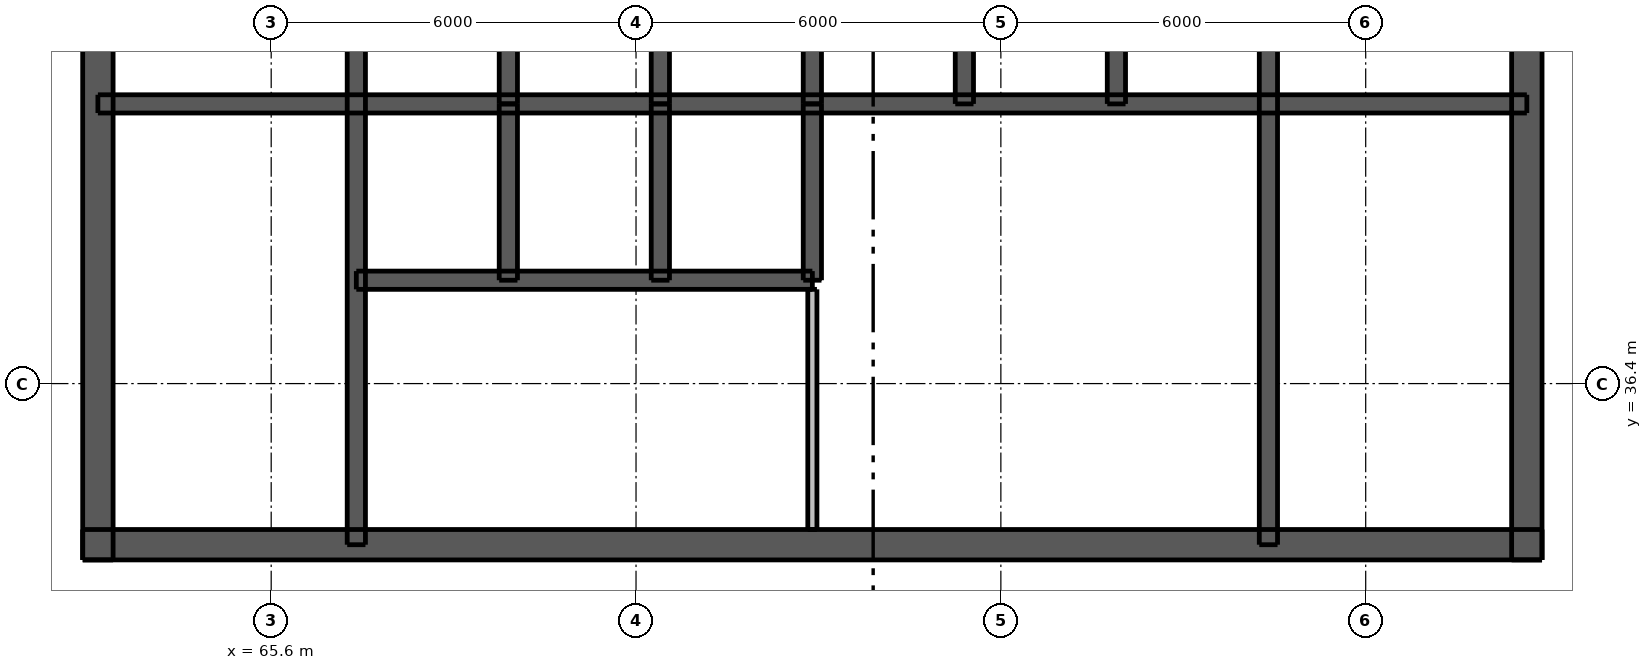
"""IFC4 building model, lengths in metres.
Left out: names, types, materials, properties, quantities, classifications, styles, units other than length and angle.
Written with IfcOpenShell. Run it as: python <this file> out.ifc"""

import sys

from ifc_helpers import new_model, si_unit, direction, frame, frame_2d, origin, place, context, subcontext, project, spatial, rectangle, extrude, element, fill, save


model = new_model("IFC4")
c1 = context("Model", 3, precision=1e-05, world=origin(), true_north=direction((0.0, 1.0)))
c2 = subcontext(c1, "Body", "Model", "MODEL_VIEW")
j1 = project(units=[si_unit("LENGTHUNIT", "METRE"), si_unit("PLANEANGLEUNIT", "RADIAN")], contexts=[c1])
p1 = place(None, origin())
s1 = spatial("IfcSite", under=j1, at=p1, CompositionType="ELEMENT")
p2 = place(p1, origin())
s2 = spatial("IfcBuilding", under=s1, at=p2, CompositionType="ELEMENT")
p3 = place(p2, frame((0.0, 0.0, 271.9)))
s3 = spatial("IfcBuildingStorey", under=s2, at=p3, CompositionType="ELEMENT", Elevation=271.9)
p4 = place(p3, frame((62.5, 33.75, 0.0), z_axis=(0.0, 0.0, 1.0), x_axis=(1.0, 0.0, 0.0)))
e1 = element("IfcWall", 1, at=p4, inside=s3, PredefinedType="SHEAR", context=c2, shape_type="SweptSolid", body=[
    extrude(rectangle(XDim=24.0, YDim=0.5, at=frame_2d((12.0, 0.0))), origin(), (0.0, 0.0, 1.0), 3.05),
])
p5 = place(p4, frame((1.875, 0.0, 0.0)))
e2 = element("IfcOpeningElement", 2, at=p5, cuts=e1, PredefinedType="OPENING", context=c2, shape_type="SweptSolid", body=[
    extrude(rectangle(XDim=1.1, YDim=2.1, at=frame_2d((0.55, 1.05))), frame((0.0, 0.26, 0.0), z_axis=(0.0, -1.0, 0.0), x_axis=(1.0, 0.0, 0.0)), (0.0, 0.0, 1.0), 0.52),
])
p6 = place(p4, frame((21.025, 0.0, 0.0)))
e3 = element("IfcOpeningElement", 3, at=p6, cuts=e1, PredefinedType="OPENING", context=c2, shape_type="SweptSolid", body=[
    extrude(rectangle(XDim=1.1, YDim=2.1, at=frame_2d((0.55, 1.05))), frame((0.0, 0.26, 0.0), z_axis=(0.0, -1.0, 0.0), x_axis=(1.0, 0.0, 0.0)), (0.0, 0.0, 1.0), 0.52),
])
p7 = place(p4, frame((8.0, 0.0, 0.0)))
e4 = element("IfcOpeningElement", 4, at=p7, cuts=e1, PredefinedType="OPENING", context=c2, shape_type="SweptSolid", body=[
    extrude(rectangle(XDim=1.1, YDim=2.1, at=frame_2d((0.55, 1.05))), frame((0.0, 0.26, 0.0), z_axis=(0.0, -1.0, 0.0), x_axis=(1.0, 0.0, 0.0)), (0.0, 0.0, 1.0), 0.52),
])
p8 = place(p4, frame((15.3, 0.0, 0.0)))
e5 = element("IfcOpeningElement", 5, at=p8, cuts=e1, PredefinedType="OPENING", context=c2, shape_type="SweptSolid", body=[
    extrude(rectangle(XDim=0.9, YDim=2.1, at=frame_2d((0.45, 1.05))), frame((0.0, 0.26, 0.0), z_axis=(0.0, -1.0, 0.0), x_axis=(1.0, 0.0, 0.0)), (0.0, 0.0, 1.0), 0.52),
])
p9 = place(p3, frame((62.75, 33.5, 0.0), z_axis=(0.0, 0.0, 1.0), x_axis=(0.0, 1.0, 0.0)))
e6 = element("IfcWall", 6, at=p9, inside=s3, PredefinedType="SHEAR", context=c2, shape_type="SweptSolid", body=[
    extrude(rectangle(XDim=24.0, YDim=0.5, at=frame_2d((12.0, 0.0))), origin(), (0.0, 0.0, 1.0), 3.05),
])
p10 = place(p9, frame((11.2, 0.0, 0.0)))
e7 = element("IfcOpeningElement", 7, at=p10, cuts=e6, PredefinedType="OPENING", context=c2, shape_type="SweptSolid", body=[
    extrude(rectangle(XDim=1.6, YDim=2.1, at=frame_2d((0.8, 1.05))), frame((0.0, 0.26, 0.0), z_axis=(0.0, -1.0, 0.0), x_axis=(1.0, 0.0, 0.0)), (0.0, 0.0, 1.0), 0.52),
])
p11 = place(p3, frame((86.25, 33.5, 0.0), z_axis=(0.0, 0.0, 1.0), x_axis=(0.0, 1.0, 0.0)))
e8 = element("IfcWall", 8, at=p11, inside=s3, PredefinedType="SHEAR", context=c2, shape_type="SweptSolid", body=[
    extrude(rectangle(XDim=24.0, YDim=0.5, at=frame_2d((12.0, 0.0))), origin(), (0.0, 0.0, 1.0), 3.05),
])
p12 = place(p11, frame((11.2, 0.0, 0.0)))
e9 = element("IfcOpeningElement", 9, at=p12, cuts=e8, PredefinedType="OPENING", context=c2, shape_type="SweptSolid", body=[
    extrude(rectangle(XDim=1.6, YDim=2.1, at=frame_2d((0.8, 1.05))), frame((0.0, 0.26, 0.0), z_axis=(0.0, -1.0, 0.0), x_axis=(1.0, 0.0, 0.0)), (0.0, 0.0, 1.0), 0.52),
])
p13 = place(p3, frame((62.75, 41.0, 0.0), z_axis=(0.0, 0.0, 1.0), x_axis=(1.0, 0.0, 0.0)))
e10 = element("IfcWall", 10, at=p13, inside=s3, PredefinedType="SHEAR", context=c2, shape_type="SweptSolid", body=[
    extrude(rectangle(XDim=23.5, YDim=0.3, at=frame_2d((11.75, 0.0))), origin(), (0.0, 0.0, 1.0), 3.05),
])
p14 = place(p3, frame((67.0, 33.75, 0.0), z_axis=(0.0, 0.0, 1.0), x_axis=(0.0, 1.0, 0.0)))
e11 = element("IfcWall", 11, at=p14, inside=s3, PredefinedType="SHEAR", context=c2, shape_type="SweptSolid", body=[
    extrude(rectangle(XDim=10.15, YDim=0.3, at=frame_2d((5.075, 0.0))), origin(), (0.0, 0.0, 1.0), 3.05),
])
p15 = place(p14, frame((0.45, 0.0, 0.0)))
e12 = element("IfcOpeningElement", 12, at=p15, cuts=e11, PredefinedType="OPENING", context=c2, shape_type="SweptSolid", body=[
    extrude(rectangle(XDim=1.1, YDim=2.1, at=frame_2d((0.55, 1.05))), frame((0.0, 0.16, 0.0), z_axis=(0.0, -1.0, 0.0), x_axis=(1.0, 0.0, 0.0)), (0.0, 0.0, 1.0), 0.32),
])
p16 = place(p3, frame((82.0, 33.75, 0.0), z_axis=(0.0, 0.0, 1.0), x_axis=(0.0, 1.0, 0.0)))
e13 = element("IfcWall", 13, at=p16, inside=s3, PredefinedType="SHEAR", context=c2, shape_type="SweptSolid", body=[
    extrude(rectangle(XDim=10.15, YDim=0.3, at=frame_2d((5.075, 0.0))), origin(), (0.0, 0.0, 1.0), 3.05),
])
for number, where, z_axis, x_axis in (
    (14, (69.5, 41.0, 0.0), (0.0, 0.0, 1.0), (0.0, 1.0, 0.0)),
    (15, (72.0, 41.0, 0.0), (0.0, 0.0, 1.0), (0.0, 1.0, 0.0)),
    (16, (74.5, 41.0, 0.0), (0.0, 0.0, 1.0), (0.0, 1.0, 0.0)),
    (17, (77.0, 41.0, 0.0), (0.0, 0.0, 1.0), (0.0, 1.0, 0.0)),
    (18, (79.5, 41.0, 0.0), (0.0, 0.0, 1.0), (0.0, 1.0, 0.0)),
):
    element("IfcWall", number, at=place(p3, frame(where, z_axis=z_axis, x_axis=x_axis)), inside=s3, PredefinedType="SHEAR", context=c2, shape_type="SweptSolid", body=[
        extrude(rectangle(XDim=2.9, YDim=0.3, at=frame_2d((1.45, 0.0))), origin(), (0.0, 0.0, 1.0), 3.05),
    ])
p17 = place(p3, frame((67.0, 38.1, 0.0), z_axis=(0.0, 0.0, 1.0), x_axis=(1.0, 0.0, 0.0)))
e19 = element("IfcWall", 19, at=p17, inside=s3, PredefinedType="SHEAR", context=c2, shape_type="SweptSolid", body=[
    extrude(rectangle(XDim=7.5, YDim=0.3, at=frame_2d((3.75, 0.0))), origin(), (0.0, 0.0, 1.0), 3.05),
])
p18 = place(p17, frame((0.7, 0.0, 0.0)))
e20 = element("IfcOpeningElement", 20, at=p18, cuts=e19, PredefinedType="OPENING", context=c2, shape_type="SweptSolid", body=[
    extrude(rectangle(XDim=1.1, YDim=2.1, at=frame_2d((0.55, 1.05))), frame((0.0, 0.16, 0.0), z_axis=(0.0, -1.0, 0.0), x_axis=(1.0, 0.0, 0.0)), (0.0, 0.0, 1.0), 0.32),
])
p19 = place(p17, frame((3.2, 0.0, 0.0)))
e21 = element("IfcOpeningElement", 21, at=p19, cuts=e19, PredefinedType="OPENING", context=c2, shape_type="SweptSolid", body=[
    extrude(rectangle(XDim=1.1, YDim=2.1, at=frame_2d((0.55, 1.05))), frame((0.0, 0.16, 0.0), z_axis=(0.0, -1.0, 0.0), x_axis=(1.0, 0.0, 0.0)), (0.0, 0.0, 1.0), 0.32),
])
p20 = place(p17, frame((5.65, 0.0, 0.0)))
e22 = element("IfcOpeningElement", 22, at=p20, cuts=e19, PredefinedType="OPENING", context=c2, shape_type="SweptSolid", body=[
    extrude(rectangle(XDim=1.2, YDim=2.1, at=frame_2d((0.6, 1.05))), frame((0.0, 0.16, 0.0), z_axis=(0.0, -1.0, 0.0), x_axis=(1.0, 0.0, 0.0)), (0.0, 0.0, 1.0), 0.32),
])
for number, where, z_axis, x_axis in (
    (23, (69.5, 38.1, 0.0), (0.0, 0.0, 1.0), (0.0, 1.0, 0.0)),
    (24, (72.0, 38.1, 0.0), (0.0, 0.0, 1.0), (0.0, 1.0, 0.0)),
    (25, (74.5, 38.1, 0.0), (0.0, 0.0, 1.0), (0.0, 1.0, 0.0)),
):
    element("IfcWall", number, at=place(p3, frame(where, z_axis=z_axis, x_axis=x_axis)), inside=s3, PredefinedType="SHEAR", context=c2, shape_type="SweptSolid", body=[
        extrude(rectangle(XDim=2.9, YDim=0.3, at=frame_2d((1.45, 0.0))), origin(), (0.0, 0.0, 1.0), 3.05),
    ])
p21 = place(p3, frame((74.5, 34.0, 0.0), z_axis=(0.0, 0.0, 1.0), x_axis=(0.0, 1.0, 0.0)))
e26 = element("IfcWall", 26, at=p21, inside=s3, PredefinedType="PLUMBINGWALL", context=c2, shape_type="SweptSolid", body=[
    extrude(rectangle(XDim=3.95, YDim=0.15, at=frame_2d((1.975, 0.0))), origin(), (0.0, 0.0, 1.0), 3.05),
])
p22 = place(p5, origin())
e27 = element("IfcDoor", 27, at=p22, inside=s3, OperationType="SINGLE_SWING_LEFT", PredefinedType="DOOR", context=c2, shape_type="SweptSolid", body=[
    extrude(rectangle(XDim=1.1, YDim=2.1, at=frame_2d((0.55, 1.05))), frame((0.0, 0.237, 0.0), z_axis=(0.0, -1.0, 0.0), x_axis=(1.0, 0.0, 0.0)), (0.0, 0.0, 1.0), 0.05),
])
fill(e2, e27)
p23 = place(p6, origin())
e28 = element("IfcDoor", 28, at=p23, inside=s3, OperationType="SINGLE_SWING_RIGHT", PredefinedType="DOOR", context=c2, shape_type="SweptSolid", body=[
    extrude(rectangle(XDim=1.1, YDim=2.1, at=frame_2d((0.55, 1.05))), frame((0.0, 0.237, 0.0), z_axis=(0.0, -1.0, 0.0), x_axis=(1.0, 0.0, 0.0)), (0.0, 0.0, 1.0), 0.05),
])
fill(e3, e28)
p24 = place(p7, origin())
e29 = element("IfcDoor", 29, at=p24, inside=s3, OperationType="SINGLE_SWING_LEFT", PredefinedType="DOOR", context=c2, shape_type="SweptSolid", body=[
    extrude(rectangle(XDim=1.1, YDim=2.1, at=frame_2d((0.55, 1.05))), frame((0.0, 0.237, 0.0), z_axis=(0.0, -1.0, 0.0), x_axis=(1.0, 0.0, 0.0)), (0.0, 0.0, 1.0), 0.05),
])
fill(e4, e29)
p25 = place(p15, origin())
e30 = element("IfcDoor", 30, at=p25, inside=s3, OperationType="SINGLE_SWING_RIGHT", PredefinedType="DOOR", context=c2, shape_type="SweptSolid", body=[
    extrude(rectangle(XDim=1.1, YDim=2.1, at=frame_2d((0.55, 1.05))), frame((0.0, -0.087, 0.0), z_axis=(0.0, -1.0, 0.0), x_axis=(1.0, 0.0, 0.0)), (0.0, 0.0, 1.0), 0.05),
])
fill(e12, e30)
p26 = place(p8, origin())
e31 = element("IfcDoor", 31, at=p26, inside=s3, OperationType="SINGLE_SWING_LEFT", PredefinedType="DOOR", context=c2, shape_type="SweptSolid", body=[
    extrude(rectangle(XDim=0.9, YDim=2.1, at=frame_2d((0.45, 1.05))), frame((0.0, 0.237, 0.0), z_axis=(0.0, -1.0, 0.0), x_axis=(1.0, 0.0, 0.0)), (0.0, 0.0, 1.0), 0.05),
])
fill(e5, e31)
p27 = place(p18, origin())
e32 = element("IfcDoor", 32, at=p27, inside=s3, OperationType="DOUBLE_DOOR_SLIDING", PredefinedType="DOOR", context=c2, shape_type="SweptSolid", body=[
    extrude(rectangle(XDim=1.1, YDim=2.1, at=frame_2d((0.55, 1.05))), frame((0.0, 0.025, 0.0), z_axis=(0.0, -1.0, 0.0), x_axis=(1.0, 0.0, 0.0)), (0.0, 0.0, 1.0), 0.05),
])
fill(e20, e32)
p28 = place(p19, origin())
e33 = element("IfcDoor", 33, at=p28, inside=s3, OperationType="DOUBLE_DOOR_SLIDING", PredefinedType="DOOR", context=c2, shape_type="SweptSolid", body=[
    extrude(rectangle(XDim=1.1, YDim=2.1, at=frame_2d((0.55, 1.05))), frame((0.0, 0.025, 0.0), z_axis=(0.0, -1.0, 0.0), x_axis=(1.0, 0.0, 0.0)), (0.0, 0.0, 1.0), 0.05),
])
fill(e21, e33)
p29 = place(p20, origin())
e34 = element("IfcDoor", 34, at=p29, inside=s3, OperationType="DOUBLE_DOOR_SLIDING", PredefinedType="DOOR", context=c2, shape_type="SweptSolid", body=[
    extrude(rectangle(XDim=1.2, YDim=2.1, at=frame_2d((0.6, 1.05))), frame((0.0, 0.025, 0.0), z_axis=(0.0, -1.0, 0.0), x_axis=(1.0, 0.0, 0.0)), (0.0, 0.0, 1.0), 0.05),
])
fill(e22, e34)
save(model, sys.argv[1])
